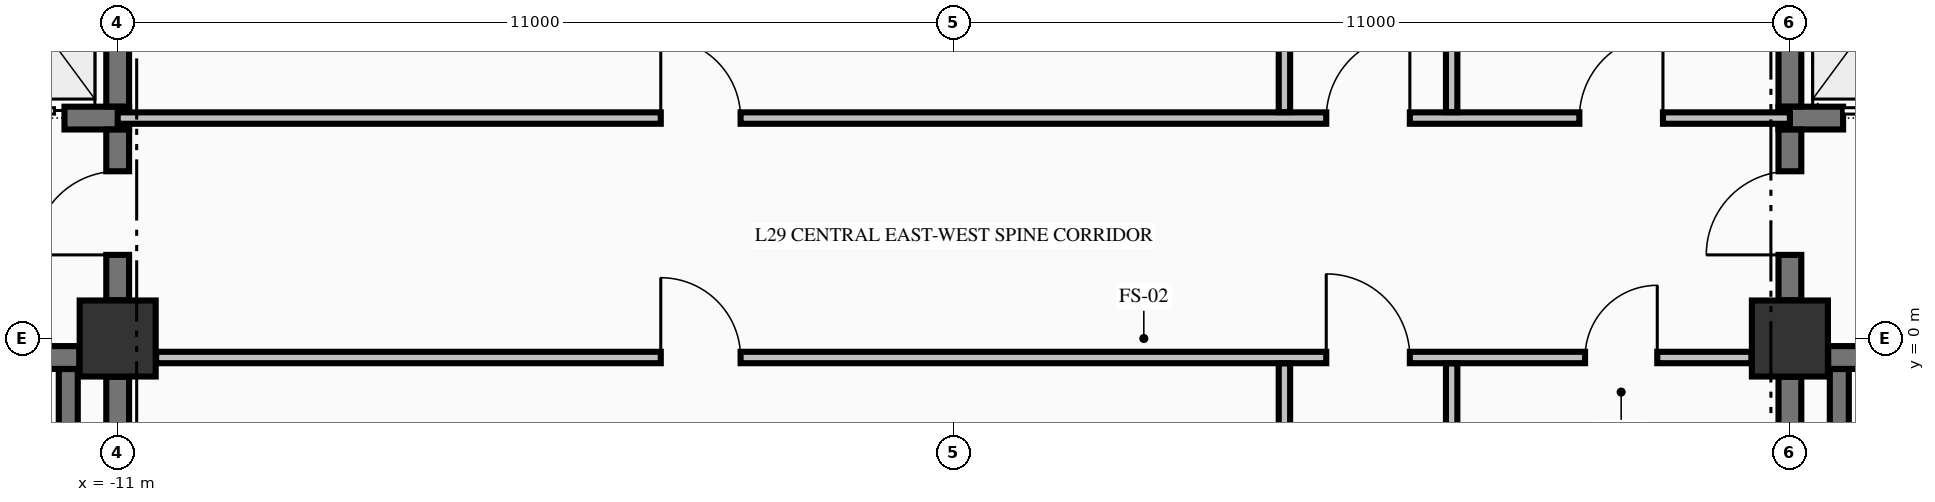
"""IFC4 building model, lengths in metres.
Left out: names, types, materials, properties, quantities, classifications, styles, units other than length and angle.
Written with IfcOpenShell. Run it as: python <this file> out.ifc"""

import sys

from ifc_helpers import new_model, si_unit, direction, frame, frame_2d, origin, origin_2d, place, context, subcontext, project, spatial, rectangle, extrude, element, fill, save


model = new_model("IFC4")
c1 = context("Model", 3, precision=1e-05, world=origin(), true_north=direction((0.0, 1.0)))
c2 = subcontext(c1, "Body", "Model", "MODEL_VIEW")
j1 = project(units=[si_unit("LENGTHUNIT", "METRE"), si_unit("PLANEANGLEUNIT", "RADIAN")], contexts=[c1])
p1 = place(None, origin())
s1 = spatial("IfcSite", under=j1, at=p1, CompositionType="ELEMENT")
p2 = place(p1, origin())
s2 = spatial("IfcBuilding", under=s1, at=p2, CompositionType="ELEMENT")
p3 = place(p2, frame((0.0, 0.0, 116.35)))
s3 = spatial("IfcBuildingStorey", under=s2, at=p3, CompositionType="ELEMENT", Elevation=116.35)
for number, where, z_axis, x_axis in (
    (1, (-11.0, 0.0, -0.425), (0.0, 0.0, 1.0), (1.0, 0.0, 0.0)),
    (2, (11.0, 0.0, -0.425), (0.0, 0.0, 1.0), (1.0, 0.0, 0.0)),
):
    element("IfcColumn", number, at=place(p3, frame(where, z_axis=z_axis, x_axis=x_axis)), inside=s3, PredefinedType="COLUMN", context=c2, shape_type="SweptSolid", body=[
        extrude(rectangle(XDim=1.0, YDim=1.0, at=origin_2d()), origin(), (0.0, 0.0, 1.0), 5.0),
    ])
p4 = place(p3, frame((-19.496, -0.25, 0.0), z_axis=(0.0, 0.0, 1.0), x_axis=(1.0, 0.0, 0.0)))
e3 = element("IfcWall", 3, at=p4, inside=s3, PredefinedType="SHEAR", context=c2, shape_type="SweptSolid", body=[
    extrude(rectangle(XDim=7.992, YDim=0.3, at=frame_2d((3.996, 0.0))), origin(), (0.0, 0.0, 1.0), 4.575),
])
p5 = place(p4, frame((5.796, 0.0, 0.0)))
e4 = element("IfcOpeningElement", 4, at=p5, cuts=e3, PredefinedType="OPENING", context=c2, shape_type="SweptSolid", body=[
    extrude(rectangle(XDim=1.1, YDim=2.15, at=frame_2d((0.55, 1.075))), frame((0.0, 0.16, 0.0), z_axis=(0.0, -1.0, 0.0), x_axis=(1.0, 0.0, 0.0)), (0.0, 0.0, 1.0), 0.32),
])
p6 = place(p3, frame((11.504, -0.25, 0.0), z_axis=(0.0, 0.0, 1.0), x_axis=(1.0, 0.0, 0.0)))
e5 = element("IfcWall", 5, at=p6, inside=s3, PredefinedType="SHEAR", context=c2, shape_type="SweptSolid", body=[
    extrude(rectangle(XDim=3.371, YDim=0.3, at=frame_2d((1.686, 0.0))), origin(), (0.0, 0.0, 1.0), 4.575),
])
p7 = place(p6, frame((1.096, 0.0, 0.0)))
e6 = element("IfcOpeningElement", 6, at=p7, cuts=e5, PredefinedType="OPENING", context=c2, shape_type="SweptSolid", body=[
    extrude(rectangle(XDim=1.1, YDim=2.15, at=frame_2d((0.55, 1.075))), frame((0.0, 0.16, 0.0), z_axis=(0.0, -1.0, 0.0), x_axis=(1.0, 0.0, 0.0)), (0.0, 0.0, 1.0), 0.32),
])
p8 = place(p3, frame((-14.875, 2.9, 0.0), z_axis=(0.0, 0.0, 1.0), x_axis=(1.0, 0.0, 0.0)))
e7 = element("IfcWall", 7, at=p8, inside=s3, PredefinedType="SHEAR", context=c2, shape_type="SweptSolid", body=[
    extrude(rectangle(XDim=4.025, YDim=0.3, at=frame_2d((2.012, 0.0))), origin(), (0.0, 0.0, 1.0), 4.575),
])
p9 = place(p8, frame((2.075, 0.0, 0.0)))
e8 = element("IfcOpeningElement", 8, at=p9, cuts=e7, PredefinedType="OPENING", context=c2, shape_type="SweptSolid", body=[
    extrude(rectangle(XDim=1.1, YDim=2.2, at=frame_2d((0.55, 1.1))), frame((0.0, 0.16, 0.0), z_axis=(0.0, -1.0, 0.0), x_axis=(1.0, 0.0, 0.0)), (0.0, 0.0, 1.0), 0.32),
])
p10 = place(p3, frame((10.85, 2.9, 0.0), z_axis=(0.0, 0.0, 1.0), x_axis=(1.0, 0.0, 0.0)))
e9 = element("IfcWall", 9, at=p10, inside=s3, PredefinedType="SHEAR", context=c2, shape_type="SweptSolid", body=[
    extrude(rectangle(XDim=4.025, YDim=0.3, at=frame_2d((2.012, 0.0))), origin(), (0.0, 0.0, 1.0), 4.575),
])
p11 = place(p10, frame((0.85, 0.0, 0.0)))
e10 = element("IfcOpeningElement", 10, at=p11, cuts=e9, PredefinedType="OPENING", context=c2, shape_type="SweptSolid", body=[
    extrude(rectangle(XDim=1.1, YDim=2.2, at=frame_2d((0.55, 1.1))), frame((0.0, 0.16, 0.0), z_axis=(0.0, -1.0, 0.0), x_axis=(1.0, 0.0, 0.0)), (0.0, 0.0, 1.0), 0.32),
])
p12 = place(p3, frame((-10.494, -0.25, 0.0), z_axis=(0.0, 0.0, 1.0), x_axis=(1.0, 0.0, 0.0)))
e11 = element("IfcWall", 11, at=p12, inside=s3, PredefinedType="PARTITIONING", context=c2, shape_type="SweptSolid", body=[
    extrude(rectangle(XDim=20.988, YDim=0.15, at=frame_2d((10.494, 0.0))), origin(), (0.0, 0.0, 1.0), 4.575),
])
p13 = place(p12, frame((15.394, 0.0, 0.0)))
e12 = element("IfcOpeningElement", 12, at=p13, cuts=e11, PredefinedType="OPENING", context=c2, shape_type="SweptSolid", body=[
    extrude(rectangle(XDim=1.1, YDim=2.15, at=frame_2d((0.55, 1.075))), frame((0.0, 0.085, 0.0), z_axis=(0.0, -1.0, 0.0), x_axis=(1.0, 0.0, 0.0)), (0.0, 0.0, 1.0), 0.17),
])
p14 = place(p12, frame((6.639, 0.0, 0.0)))
e13 = element("IfcOpeningElement", 13, at=p14, cuts=e11, PredefinedType="OPENING", context=c2, shape_type="SweptSolid", body=[
    extrude(rectangle(XDim=1.05, YDim=2.15, at=frame_2d((0.525, 1.075))), frame((0.0, 0.085, 0.0), z_axis=(0.0, -1.0, 0.0), x_axis=(1.0, 0.0, 0.0)), (0.0, 0.0, 1.0), 0.17),
])
p15 = place(p12, frame((18.799, 0.0, 0.0)))
e14 = element("IfcOpeningElement", 14, at=p15, cuts=e11, PredefinedType="OPENING", context=c2, shape_type="SweptSolid", body=[
    extrude(rectangle(XDim=0.95, YDim=2.15, at=frame_2d((0.475, 1.075))), frame((0.0, 0.085, 0.0), z_axis=(0.0, -1.0, 0.0), x_axis=(1.0, 0.0, 0.0)), (0.0, 0.0, 1.0), 0.17),
])
p16 = place(p3, frame((-11.0, 2.9, 0.0), z_axis=(0.0, 0.0, 1.0), x_axis=(1.0, 0.0, 0.0)))
e15 = element("IfcWall", 15, at=p16, inside=s3, PredefinedType="PARTITIONING", context=c2, shape_type="SweptSolid", body=[
    extrude(rectangle(XDim=22.0, YDim=0.15, at=frame_2d((11.0, 0.0))), origin(), (0.0, 0.0, 1.0), 4.575),
])
p17 = place(p16, frame((15.9, 0.0, 0.0)))
e16 = element("IfcOpeningElement", 16, at=p17, cuts=e15, PredefinedType="OPENING", context=c2, shape_type="SweptSolid", body=[
    extrude(rectangle(XDim=1.1, YDim=2.15, at=frame_2d((0.55, 1.075))), frame((0.0, 0.085, 0.0), z_axis=(0.0, -1.0, 0.0), x_axis=(1.0, 0.0, 0.0)), (0.0, 0.0, 1.0), 0.17),
])
p18 = place(p16, frame((7.145, 0.0, 0.0)))
e17 = element("IfcOpeningElement", 17, at=p18, cuts=e15, PredefinedType="OPENING", context=c2, shape_type="SweptSolid", body=[
    extrude(rectangle(XDim=1.05, YDim=2.15, at=frame_2d((0.525, 1.075))), frame((0.0, 0.085, 0.0), z_axis=(0.0, -1.0, 0.0), x_axis=(1.0, 0.0, 0.0)), (0.0, 0.0, 1.0), 0.17),
])
p19 = place(p16, frame((19.23, 0.0, 0.0)))
e18 = element("IfcOpeningElement", 18, at=p19, cuts=e15, PredefinedType="OPENING", context=c2, shape_type="SweptSolid", body=[
    extrude(rectangle(XDim=1.1, YDim=2.15, at=frame_2d((0.55, 1.075))), frame((0.0, 0.085, 0.0), z_axis=(0.0, -1.0, 0.0), x_axis=(1.0, 0.0, 0.0)), (0.0, 0.0, 1.0), 0.17),
])
p20 = place(p3, frame((-11.65, -9.798, 0.0), z_axis=(0.0, 0.0, 1.0), x_axis=(0.0, 1.0, 0.0)))
e19 = element("IfcWall", 19, at=p20, inside=s3, PredefinedType="SOLIDWALL", context=c2, shape_type="SweptSolid", body=[
    extrude(rectangle(XDim=9.396, YDim=0.25, at=frame_2d((4.698, 0.0))), origin(), (0.0, 0.0, 1.0), 4.575),
])
p21 = place(p3, frame((-11.0, -9.446, 0.0), z_axis=(0.0, 0.0, 1.0), x_axis=(0.0, 1.0, 0.0)))
e20 = element("IfcWall", 20, at=p21, inside=s3, PredefinedType="SHEAR", context=c2, shape_type="SweptSolid", body=[
    extrude(rectangle(XDim=8.942, YDim=0.3, at=frame_2d((4.471, 0.0))), origin(), (0.0, 0.0, 1.0), 4.575),
])
p22 = place(p3, frame((-11.0, 0.504, 0.0), z_axis=(0.0, 0.0, 1.0), x_axis=(0.0, 1.0, 0.0)))
e21 = element("IfcWall", 21, at=p22, inside=s3, PredefinedType="SHEAR", context=c2, shape_type="SweptSolid", body=[
    extrude(rectangle(XDim=2.244, YDim=0.3, at=frame_2d((1.122, 0.0))), origin(), (0.0, 0.0, 1.0), 4.575),
])
p23 = place(p22, frame((0.596, 0.0, 0.0)))
e22 = element("IfcOpeningElement", 22, at=p23, cuts=e21, PredefinedType="OPENING", context=c2, shape_type="SweptSolid", body=[
    extrude(rectangle(XDim=1.1, YDim=2.15, at=frame_2d((0.55, 1.075))), frame((0.0, 0.16, 0.0), z_axis=(0.0, -1.0, 0.0), x_axis=(1.0, 0.0, 0.0)), (0.0, 0.0, 1.0), 0.32),
])
p24 = place(p3, frame((-11.0, 3.052, 0.0), z_axis=(0.0, 0.0, 1.0), x_axis=(0.0, 1.0, 0.0)))
e23 = element("IfcWall", 23, at=p24, inside=s3, PredefinedType="SHEAR", context=c2, shape_type="SweptSolid", body=[
    extrude(rectangle(XDim=2.496, YDim=0.3, at=frame_2d((1.248, 0.0))), origin(), (0.0, 0.0, 1.0), 4.575),
])
p25 = place(p3, frame((11.0, -9.446, 0.0), z_axis=(0.0, 0.0, 1.0), x_axis=(0.0, 1.0, 0.0)))
e24 = element("IfcWall", 24, at=p25, inside=s3, PredefinedType="SHEAR", context=c2, shape_type="SweptSolid", body=[
    extrude(rectangle(XDim=8.942, YDim=0.3, at=frame_2d((4.471, 0.0))), origin(), (0.0, 0.0, 1.0), 4.575),
])
p26 = place(p3, frame((11.0, 0.504, 0.0), z_axis=(0.0, 0.0, 1.0), x_axis=(0.0, 1.0, 0.0)))
e25 = element("IfcWall", 25, at=p26, inside=s3, PredefinedType="SHEAR", context=c2, shape_type="SweptSolid", body=[
    extrude(rectangle(XDim=2.244, YDim=0.3, at=frame_2d((1.122, 0.0))), origin(), (0.0, 0.0, 1.0), 4.575),
])
p27 = place(p26, frame((0.596, 0.0, 0.0)))
e26 = element("IfcOpeningElement", 26, at=p27, cuts=e25, PredefinedType="OPENING", context=c2, shape_type="SweptSolid", body=[
    extrude(rectangle(XDim=1.1, YDim=2.15, at=frame_2d((0.55, 1.075))), frame((0.0, 0.16, 0.0), z_axis=(0.0, -1.0, 0.0), x_axis=(1.0, 0.0, 0.0)), (0.0, 0.0, 1.0), 0.32),
])
p28 = place(p3, frame((11.0, 3.052, 0.0), z_axis=(0.0, 0.0, 1.0), x_axis=(0.0, 1.0, 0.0)))
e27 = element("IfcWall", 27, at=p28, inside=s3, PredefinedType="SHEAR", context=c2, shape_type="SweptSolid", body=[
    extrude(rectangle(XDim=2.496, YDim=0.3, at=frame_2d((1.248, 0.0))), origin(), (0.0, 0.0, 1.0), 4.575),
])
p29 = place(p3, frame((11.65, -9.798, 0.0), z_axis=(0.0, 0.0, 1.0), x_axis=(0.0, 1.0, 0.0)))
e28 = element("IfcWall", 28, at=p29, inside=s3, PredefinedType="SOLIDWALL", context=c2, shape_type="SweptSolid", body=[
    extrude(rectangle(XDim=9.396, YDim=0.25, at=frame_2d((4.698, 0.0))), origin(), (0.0, 0.0, 1.0), 4.575),
])
p30 = place(p3, frame((4.35, -9.872, 0.0), z_axis=(0.0, 0.0, 1.0), x_axis=(0.0, 1.0, 0.0)))
e29 = element("IfcWall", 29, at=p30, inside=s3, PredefinedType="PARTITIONING", context=c2, shape_type="SweptSolid", body=[
    extrude(rectangle(XDim=9.544, YDim=0.15, at=frame_2d((4.772, 0.0))), origin(), (0.0, 0.0, 1.0), 4.575),
])
p31 = place(p3, frame((4.35, 2.978, 0.0), z_axis=(0.0, 0.0, 1.0), x_axis=(0.0, 1.0, 0.0)))
e30 = element("IfcWall", 30, at=p31, inside=s3, PredefinedType="PARTITIONING", context=c2, shape_type="SweptSolid", body=[
    extrude(rectangle(XDim=7.444, YDim=0.15, at=frame_2d((3.722, 0.0))), origin(), (0.0, 0.0, 1.0), 4.575),
])
p32 = place(p3, frame((6.55, -5.247, 0.0), z_axis=(0.0, 0.0, 1.0), x_axis=(0.0, 1.0, 0.0)))
e31 = element("IfcWall", 31, at=p32, inside=s3, PredefinedType="PARTITIONING", context=c2, shape_type="SweptSolid", body=[
    extrude(rectangle(XDim=4.919, YDim=0.15, at=frame_2d((2.459, 0.0))), origin(), (0.0, 0.0, 1.0), 4.575),
])
p33 = place(p3, frame((6.55, 2.978, 0.0), z_axis=(0.0, 0.0, 1.0), x_axis=(0.0, 1.0, 0.0)))
e32 = element("IfcWall", 32, at=p33, inside=s3, PredefinedType="PARTITIONING", context=c2, shape_type="SweptSolid", body=[
    extrude(rectangle(XDim=7.444, YDim=0.15, at=frame_2d((3.722, 0.0))), origin(), (0.0, 0.0, 1.0), 4.575),
])
p34 = place(p23, origin())
e33 = element("IfcDoor", 33, at=p34, inside=s3, OperationType="SINGLE_SWING_LEFT", PredefinedType="DOOR", context=c2, shape_type="SweptSolid", body=[
    extrude(rectangle(XDim=1.1, YDim=2.15, at=frame_2d((0.55, 1.075))), frame((0.0, 0.025, 0.0), z_axis=(0.0, -1.0, 0.0), x_axis=(1.0, 0.0, 0.0)), (0.0, 0.0, 1.0), 0.05),
])
fill(e22, e33)
p35 = place(p9, origin())
e34 = element("IfcDoor", 34, at=p35, inside=s3, OperationType="SLIDING_TO_LEFT", PredefinedType="DOOR", context=c2, shape_type="SweptSolid", body=[
    extrude(rectangle(XDim=1.1, YDim=2.2, at=frame_2d((0.55, 1.1))), frame((0.0, 0.025, 0.0), z_axis=(0.0, -1.0, 0.0), x_axis=(1.0, 0.0, 0.0)), (0.0, 0.0, 1.0), 0.05),
])
fill(e8, e34)
p36 = place(p27, origin())
e35 = element("IfcDoor", 35, at=p36, inside=s3, OperationType="SINGLE_SWING_LEFT", PredefinedType="DOOR", context=c2, shape_type="SweptSolid", body=[
    extrude(rectangle(XDim=1.1, YDim=2.15, at=frame_2d((0.55, 1.075))), frame((0.0, 0.025, 0.0), z_axis=(0.0, -1.0, 0.0), x_axis=(1.0, 0.0, 0.0)), (0.0, 0.0, 1.0), 0.05),
])
fill(e26, e35)
p37 = place(p11, origin())
e36 = element("IfcDoor", 36, at=p37, inside=s3, OperationType="SLIDING_TO_RIGHT", PredefinedType="DOOR", context=c2, shape_type="SweptSolid", body=[
    extrude(rectangle(XDim=1.1, YDim=2.2, at=frame_2d((0.55, 1.1))), frame((0.0, 0.025, 0.0), z_axis=(0.0, -1.0, 0.0), x_axis=(1.0, 0.0, 0.0)), (0.0, 0.0, 1.0), 0.05),
])
fill(e10, e36)
p38 = place(p17, origin())
e37 = element("IfcDoor", 37, at=p38, inside=s3, OperationType="SINGLE_SWING_RIGHT", PredefinedType="DOOR", context=c2, shape_type="SweptSolid", body=[
    extrude(rectangle(XDim=1.1, YDim=2.15, at=frame_2d((0.55, 1.075))), frame((0.0, 0.025, 0.0), z_axis=(0.0, -1.0, 0.0), x_axis=(1.0, 0.0, 0.0)), (0.0, 0.0, 1.0), 0.05),
])
fill(e16, e37)
p39 = place(p13, origin())
e38 = element("IfcDoor", 38, at=p39, inside=s3, OperationType="SINGLE_SWING_LEFT", PredefinedType="DOOR", context=c2, shape_type="SweptSolid", body=[
    extrude(rectangle(XDim=1.1, YDim=2.15, at=frame_2d((0.55, 1.075))), frame((0.0, 0.025, 0.0), z_axis=(0.0, -1.0, 0.0), x_axis=(1.0, 0.0, 0.0)), (0.0, 0.0, 1.0), 0.05),
])
fill(e12, e38)
p40 = place(p18, origin())
e39 = element("IfcDoor", 39, at=p40, inside=s3, OperationType="SINGLE_SWING_LEFT", PredefinedType="DOOR", context=c2, shape_type="SweptSolid", body=[
    extrude(rectangle(XDim=1.05, YDim=2.15, at=frame_2d((0.525, 1.075))), frame((0.0, 0.025, 0.0), z_axis=(0.0, -1.0, 0.0), x_axis=(1.0, 0.0, 0.0)), (0.0, 0.0, 1.0), 0.05),
])
fill(e17, e39)
p41 = place(p19, origin())
e40 = element("IfcDoor", 40, at=p41, inside=s3, OperationType="SINGLE_SWING_RIGHT", PredefinedType="DOOR", context=c2, shape_type="SweptSolid", body=[
    extrude(rectangle(XDim=1.1, YDim=2.15, at=frame_2d((0.55, 1.075))), frame((0.0, 0.025, 0.0), z_axis=(0.0, -1.0, 0.0), x_axis=(1.0, 0.0, 0.0)), (0.0, 0.0, 1.0), 0.05),
])
fill(e18, e40)
p42 = place(p14, origin())
e41 = element("IfcDoor", 41, at=p42, inside=s3, OperationType="SINGLE_SWING_LEFT", PredefinedType="DOOR", context=c2, shape_type="SweptSolid", body=[
    extrude(rectangle(XDim=1.05, YDim=2.15, at=frame_2d((0.525, 1.075))), frame((0.0, 0.025, 0.0), z_axis=(0.0, -1.0, 0.0), x_axis=(1.0, 0.0, 0.0)), (0.0, 0.0, 1.0), 0.05),
])
fill(e13, e41)
p43 = place(p15, origin())
e42 = element("IfcDoor", 42, at=p43, inside=s3, OperationType="SINGLE_SWING_RIGHT", PredefinedType="DOOR", context=c2, shape_type="SweptSolid", body=[
    extrude(rectangle(XDim=0.95, YDim=2.15, at=frame_2d((0.475, 1.075))), frame((0.0, 0.025, 0.0), z_axis=(0.0, -1.0, 0.0), x_axis=(1.0, 0.0, 0.0)), (0.0, 0.0, 1.0), 0.05),
])
fill(e14, e42)
save(model, sys.argv[1])
